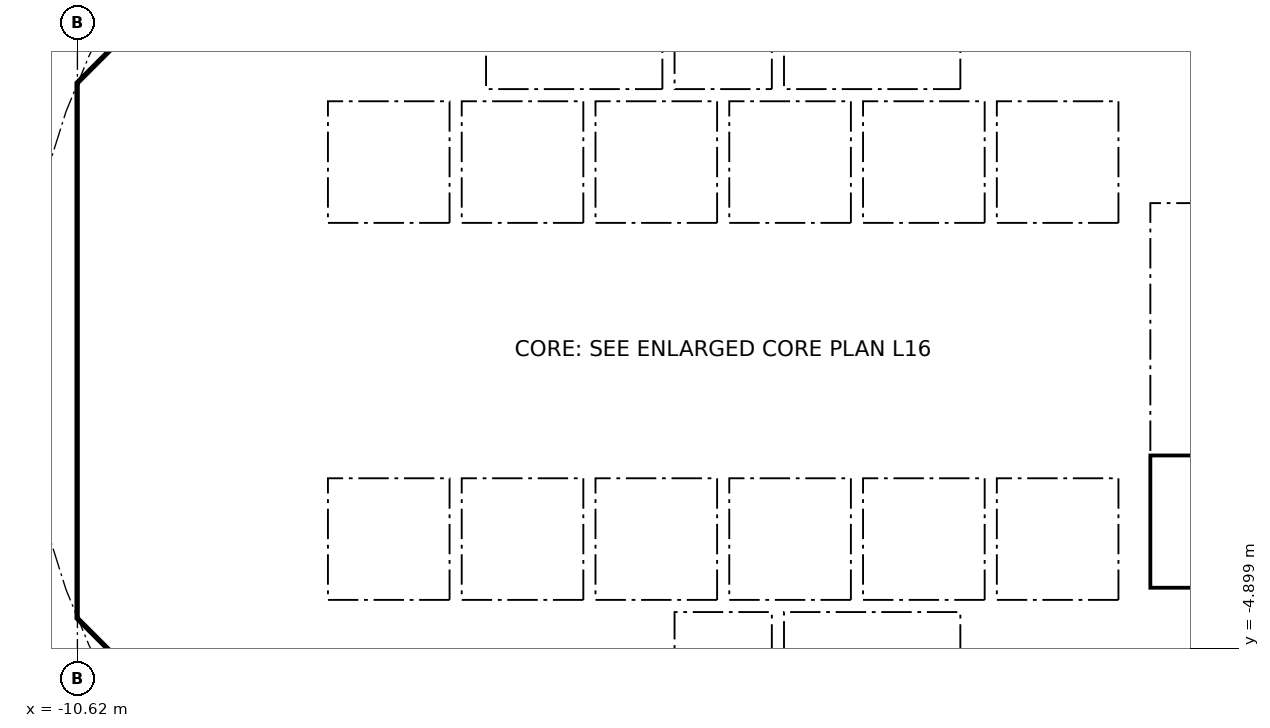
"""IFC4 building model, lengths in metres.
Left out: names, types, materials, properties, quantities, classifications, styles, units other than length and angle.
Written with IfcOpenShell. Run it as: python <this file> out.ifc"""

import sys

from ifc_helpers import new_model, si_unit, direction, frame, frame_2d, origin, place, context, subcontext, project, spatial, polyline, rectangle, outline, extrude, element, fill, save


model = new_model("IFC4")
c1 = context("Model", 3, precision=1e-05, world=origin(), true_north=direction((0.0, 1.0)))
c2 = subcontext(c1, "Body", "Model", "MODEL_VIEW")
j1 = project(units=[si_unit("LENGTHUNIT", "METRE"), si_unit("PLANEANGLEUNIT", "RADIAN")], contexts=[c1])
p1 = place(None, origin())
s1 = spatial("IfcSite", under=j1, at=p1, CompositionType="ELEMENT")
p2 = place(p1, origin())
s2 = spatial("IfcBuilding", under=s1, at=p2, CompositionType="ELEMENT")
p3 = place(p2, frame((0.0, 0.0, 67.7)))
s3 = spatial("IfcBuildingStorey", under=s2, at=p3, CompositionType="ELEMENT", Elevation=67.7)
p4 = place(p3, frame((9.988, 4.613, 0.0), z_axis=(0.0, 0.0, 1.0), x_axis=(-0.707106781187, 0.707106781187, 0.0)))
e1 = element("IfcWall", 1, at=p4, inside=s3, PredefinedType="SHEAR", context=c2, shape_type="SweptSolid", body=[
    extrude(rectangle(XDim=7.602, YDim=0.6, at=frame_2d((3.801, 0.0))), origin(), (0.0, 0.0, 1.0), 5.34),
])
p5 = place(p4, frame((3.201, 0.0, 0.0)))
e2 = element("IfcOpeningElement", 2, at=p5, cuts=e1, PredefinedType="OPENING", context=c2, shape_type="SweptSolid", body=[
    extrude(rectangle(XDim=1.2, YDim=2.1, at=frame_2d((0.6, 1.05))), frame((0.0, 0.31, 0.0), z_axis=(0.0, -1.0, 0.0), x_axis=(1.0, 0.0, 0.0)), (0.0, 0.0, 1.0), 0.62),
])
p6 = place(p3, frame((-4.613, 9.988, 0.0), z_axis=(0.0, 0.0, 1.0), x_axis=(-0.707106781187, -0.707106781187, 0.0)))
e3 = element("IfcWall", 3, at=p6, inside=s3, PredefinedType="SHEAR", context=c2, shape_type="SweptSolid", body=[
    extrude(rectangle(XDim=7.602, YDim=0.6, at=frame_2d((3.801, 0.0))), origin(), (0.0, 0.0, 1.0), 5.34),
])
p7 = place(p6, frame((0.351, 0.0, 0.0)))
e4 = element("IfcOpeningElement", 4, at=p7, cuts=e3, PredefinedType="OPENING", context=c2, shape_type="SweptSolid", body=[
    extrude(rectangle(XDim=1.1, YDim=2.1, at=frame_2d((0.55, 1.05))), frame((0.0, 0.31, 0.0), z_axis=(0.0, -1.0, 0.0), x_axis=(1.0, 0.0, 0.0)), (0.0, 0.0, 1.0), 0.62),
])
p8 = place(p3, frame((-10.325, 3.801, 0.0), z_axis=(0.0, 0.0, 1.0), x_axis=(0.0, -1.0, 0.0)))
e5 = element("IfcWall", 5, at=p8, inside=s3, PredefinedType="SHEAR", context=c2, shape_type="SweptSolid", body=[
    extrude(rectangle(XDim=7.602, YDim=0.6, at=frame_2d((3.801, 0.0))), origin(), (0.0, 0.0, 1.0), 5.34),
])
p9 = place(p8, frame((0.651, 0.0, 0.0)))
e6 = element("IfcOpeningElement", 6, at=p9, cuts=e5, PredefinedType="OPENING", context=c2, shape_type="SweptSolid", body=[
    extrude(rectangle(XDim=1.5, YDim=2.1, at=frame_2d((0.75, 1.05))), frame((0.0, 0.31, 0.0), z_axis=(0.0, -1.0, 0.0), x_axis=(1.0, 0.0, 0.0)), (0.0, 0.0, 1.0), 0.62),
])
p10 = place(p8, frame((5.451, 0.0, 0.0)))
e7 = element("IfcOpeningElement", 7, at=p10, cuts=e5, PredefinedType="OPENING", context=c2, shape_type="SweptSolid", body=[
    extrude(rectangle(XDim=1.5, YDim=2.1, at=frame_2d((0.75, 1.05))), frame((0.0, 0.31, 0.0), z_axis=(0.0, -1.0, 0.0), x_axis=(1.0, 0.0, 0.0)), (0.0, 0.0, 1.0), 0.62),
])
p11 = place(p3, frame((-9.988, -4.613, 0.0), z_axis=(0.0, 0.0, 1.0), x_axis=(0.707106781187, -0.707106781187, 0.0)))
e8 = element("IfcWall", 8, at=p11, inside=s3, PredefinedType="SHEAR", context=c2, shape_type="SweptSolid", body=[
    extrude(rectangle(XDim=7.602, YDim=0.6, at=frame_2d((3.801, 0.0))), origin(), (0.0, 0.0, 1.0), 5.34),
])
p12 = place(p11, frame((6.151, 0.0, 0.0)))
e9 = element("IfcOpeningElement", 9, at=p12, cuts=e8, PredefinedType="OPENING", context=c2, shape_type="SweptSolid", body=[
    extrude(rectangle(XDim=1.1, YDim=2.1, at=frame_2d((0.55, 1.05))), frame((0.0, 0.31, 0.0), z_axis=(0.0, -1.0, 0.0), x_axis=(1.0, 0.0, 0.0)), (0.0, 0.0, 1.0), 0.62),
])
p13 = place(p3, frame((4.613, -9.988, 0.0), z_axis=(0.0, 0.0, 1.0), x_axis=(0.707106781187, 0.707106781187, 0.0)))
e10 = element("IfcWall", 10, at=p13, inside=s3, PredefinedType="SHEAR", context=c2, shape_type="SweptSolid", body=[
    extrude(rectangle(XDim=7.602, YDim=0.6, at=frame_2d((3.801, 0.0))), origin(), (0.0, 0.0, 1.0), 5.34),
])
p14 = place(p13, frame((3.201, 0.0, 0.0)))
e11 = element("IfcOpeningElement", 11, at=p14, cuts=e10, PredefinedType="OPENING", context=c2, shape_type="SweptSolid", body=[
    extrude(rectangle(XDim=1.2, YDim=2.1, at=frame_2d((0.6, 1.05))), frame((0.0, 0.31, 0.0), z_axis=(0.0, -1.0, 0.0), x_axis=(1.0, 0.0, 0.0)), (0.0, 0.0, 1.0), 0.62),
])
p15 = place(p3, frame((-6.2, 4.3, 0.0), z_axis=(0.0, 0.0, 1.0), x_axis=(0.0, 1.0, 0.0)))
e12 = element("IfcWall", 12, at=p15, inside=s3, PredefinedType="PARTITIONING", context=c2, shape_type="SweptSolid", body=[
    extrude(rectangle(XDim=3.527, YDim=0.15, at=frame_2d((1.763, 0.0))), origin(), (0.0, 0.0, 1.0), 5.34),
])
p16 = place(p15, frame((0.262, 0.0, 0.0)))
e13 = element("IfcOpeningElement", 13, at=p16, cuts=e12, PredefinedType="OPENING", context=c2, shape_type="SweptSolid", body=[
    extrude(rectangle(XDim=0.9, YDim=2.1, at=frame_2d((0.45, 1.05))), frame((0.0, 0.085, 0.0), z_axis=(0.0, -1.0, 0.0), x_axis=(1.0, 0.0, 0.0)), (0.0, 0.0, 1.0), 0.17),
])
p17 = place(p15, frame((2.138, 0.0, 0.0)))
e14 = element("IfcOpeningElement", 14, at=p17, cuts=e12, PredefinedType="OPENING", context=c2, shape_type="SweptSolid", body=[
    extrude(rectangle(XDim=0.9, YDim=2.1, at=frame_2d((0.45, 1.05))), frame((0.0, 0.085, 0.0), z_axis=(0.0, -1.0, 0.0), x_axis=(1.0, 0.0, 0.0)), (0.0, 0.0, 1.0), 0.17),
])
p18 = place(p3, frame((4.0, 4.3, 0.0), z_axis=(0.0, 0.0, 1.0), x_axis=(0.0, 1.0, 0.0)))
e15 = element("IfcWall", 15, at=p18, inside=s3, PredefinedType="SOLIDWALL", context=c2, shape_type="SweptSolid", body=[
    extrude(rectangle(XDim=2.2, YDim=0.2, at=frame_2d((1.1, 0.0))), origin(), (0.0, 0.0, 1.0), 5.34),
])
p19 = place(p18, frame((0.55, 0.0, 0.0)))
e16 = element("IfcOpeningElement", 16, at=p19, cuts=e15, PredefinedType="OPENING", context=c2, shape_type="SweptSolid", body=[
    extrude(rectangle(XDim=1.1, YDim=2.1, at=frame_2d((0.55, 1.05))), frame((0.0, 0.11, 0.0), z_axis=(0.0, -1.0, 0.0), x_axis=(1.0, 0.0, 0.0)), (0.0, 0.0, 1.0), 0.22),
])
p20 = place(p3, frame((-4.0, 4.3, 0.0), z_axis=(0.0, 0.0, 1.0), x_axis=(0.0, 1.0, 0.0)))
e17 = element("IfcWall", 17, at=p20, inside=s3, PredefinedType="SOLIDWALL", context=c2, shape_type="SweptSolid", body=[
    extrude(rectangle(XDim=2.2, YDim=0.2, at=frame_2d((1.1, 0.0))), origin(), (0.0, 0.0, 1.0), 5.34),
])
p21 = place(p20, frame((0.55, 0.0, 0.0)))
e18 = element("IfcOpeningElement", 18, at=p21, cuts=e17, PredefinedType="OPENING", context=c2, shape_type="SweptSolid", body=[
    extrude(rectangle(XDim=1.1, YDim=2.1, at=frame_2d((0.55, 1.05))), frame((0.0, 0.11, 0.0), z_axis=(0.0, -1.0, 0.0), x_axis=(1.0, 0.0, 0.0)), (0.0, 0.0, 1.0), 0.22),
])
p22 = place(p3, frame((-6.7, 2.0, 0.0), z_axis=(0.0, 0.0, 1.0), x_axis=(1.0, 0.0, 0.0)))
e19 = element("IfcWall", 19, at=p22, inside=s3, PredefinedType="SOLIDWALL", context=c2, shape_type="SweptSolid", body=[
    extrude(rectangle(XDim=13.4, YDim=0.2, at=frame_2d((6.7, 0.0))), origin(), (0.0, 0.0, 1.0), 5.34),
])
p23 = place(p22, frame((0.65, 0.0, 0.0)))
e20 = element("IfcOpeningElement", 20, at=p23, cuts=e19, PredefinedType="OPENING", context=c2, shape_type="SweptSolid", body=[
    extrude(rectangle(XDim=1.1, YDim=2.1, at=frame_2d((0.55, 1.05))), frame((0.0, 0.11, 0.0), z_axis=(0.0, -1.0, 0.0), x_axis=(1.0, 0.0, 0.0)), (0.0, 0.0, 1.0), 0.22),
])
p24 = place(p22, frame((2.85, 0.0, 0.0)))
e21 = element("IfcOpeningElement", 21, at=p24, cuts=e19, PredefinedType="OPENING", context=c2, shape_type="SweptSolid", body=[
    extrude(rectangle(XDim=1.1, YDim=2.1, at=frame_2d((0.55, 1.05))), frame((0.0, 0.11, 0.0), z_axis=(0.0, -1.0, 0.0), x_axis=(1.0, 0.0, 0.0)), (0.0, 0.0, 1.0), 0.22),
])
p25 = place(p22, frame((5.05, 0.0, 0.0)))
e22 = element("IfcOpeningElement", 22, at=p25, cuts=e19, PredefinedType="OPENING", context=c2, shape_type="SweptSolid", body=[
    extrude(rectangle(XDim=1.1, YDim=2.1, at=frame_2d((0.55, 1.05))), frame((0.0, 0.11, 0.0), z_axis=(0.0, -1.0, 0.0), x_axis=(1.0, 0.0, 0.0)), (0.0, 0.0, 1.0), 0.22),
])
p26 = place(p3, frame((6.7, 4.0, 0.0), z_axis=(0.0, 0.0, 1.0), x_axis=(1.0, 0.0, 0.0)))
e23 = element("IfcWall", 23, at=p26, inside=s3, PredefinedType="SOLIDWALL", context=c2, shape_type="SweptSolid", body=[
    extrude(rectangle(XDim=3.325, YDim=0.2, at=frame_2d((1.662, 0.0))), origin(), (0.0, 0.0, 1.0), 5.34),
])
p27 = place(p26, frame((1.25, 0.0, 0.0)))
e24 = element("IfcOpeningElement", 24, at=p27, cuts=e23, PredefinedType="OPENING", context=c2, shape_type="SweptSolid", body=[
    extrude(rectangle(XDim=1.1, YDim=2.1, at=frame_2d((0.55, 1.05))), frame((0.0, 0.11, 0.0), z_axis=(0.0, -1.0, 0.0), x_axis=(1.0, 0.0, 0.0)), (0.0, 0.0, 1.0), 0.22),
])
p28 = place(p3, frame((-7.0, -7.027, 0.0), z_axis=(0.0, 0.0, 1.0), x_axis=(0.0, 1.0, 0.0)))
e25 = element("IfcWall", 25, at=p28, inside=s3, PredefinedType="PARTITIONING", context=c2, shape_type="SweptSolid", body=[
    extrude(rectangle(XDim=2.927, YDim=0.15, at=frame_2d((1.463, 0.0))), origin(), (0.0, 0.0, 1.0), 5.34),
])
p29 = place(p28, frame((0.976, 0.0, 0.0)))
e26 = element("IfcOpeningElement", 26, at=p29, cuts=e25, PredefinedType="OPENING", context=c2, shape_type="SweptSolid", body=[
    extrude(rectangle(XDim=0.9, YDim=2.1, at=frame_2d((0.45, 1.05))), frame((0.0, 0.085, 0.0), z_axis=(0.0, -1.0, 0.0), x_axis=(1.0, 0.0, 0.0)), (0.0, 0.0, 1.0), 0.17),
])
p30 = place(p3, frame((4.0, -6.5, 0.0), z_axis=(0.0, 0.0, 1.0), x_axis=(0.0, 1.0, 0.0)))
e27 = element("IfcWall", 27, at=p30, inside=s3, PredefinedType="SOLIDWALL", context=c2, shape_type="SweptSolid", body=[
    extrude(rectangle(XDim=2.2, YDim=0.2, at=frame_2d((1.1, 0.0))), origin(), (0.0, 0.0, 1.0), 5.34),
])
p31 = place(p30, frame((0.55, 0.0, 0.0)))
e28 = element("IfcOpeningElement", 28, at=p31, cuts=e27, PredefinedType="OPENING", context=c2, shape_type="SweptSolid", body=[
    extrude(rectangle(XDim=1.1, YDim=2.1, at=frame_2d((0.55, 1.05))), frame((0.0, 0.11, 0.0), z_axis=(0.0, -1.0, 0.0), x_axis=(1.0, 0.0, 0.0)), (0.0, 0.0, 1.0), 0.22),
])
p32 = place(p3, frame((-4.0, -6.5, 0.0), z_axis=(0.0, 0.0, 1.0), x_axis=(0.0, 1.0, 0.0)))
e29 = element("IfcWall", 29, at=p32, inside=s3, PredefinedType="SOLIDWALL", context=c2, shape_type="SweptSolid", body=[
    extrude(rectangle(XDim=2.2, YDim=0.2, at=frame_2d((1.1, 0.0))), origin(), (0.0, 0.0, 1.0), 5.34),
])
p33 = place(p32, frame((0.65, 0.0, 0.0)))
e30 = element("IfcOpeningElement", 30, at=p33, cuts=e29, PredefinedType="OPENING", context=c2, shape_type="SweptSolid", body=[
    extrude(rectangle(XDim=0.9, YDim=2.1, at=frame_2d((0.45, 1.05))), frame((0.0, 0.11, 0.0), z_axis=(0.0, -1.0, 0.0), x_axis=(1.0, 0.0, 0.0)), (0.0, 0.0, 1.0), 0.22),
])
p34 = place(p3, frame((-6.7, -2.0, 0.0), z_axis=(0.0, 0.0, 1.0), x_axis=(1.0, 0.0, 0.0)))
e31 = element("IfcWall", 31, at=p34, inside=s3, PredefinedType="SOLIDWALL", context=c2, shape_type="SweptSolid", body=[
    extrude(rectangle(XDim=13.4, YDim=0.2, at=frame_2d((6.7, 0.0))), origin(), (0.0, 0.0, 1.0), 5.34),
])
p35 = place(p34, frame((0.65, 0.0, 0.0)))
e32 = element("IfcOpeningElement", 32, at=p35, cuts=e31, PredefinedType="OPENING", context=c2, shape_type="SweptSolid", body=[
    extrude(rectangle(XDim=1.1, YDim=2.1, at=frame_2d((0.55, 1.05))), frame((0.0, 0.11, 0.0), z_axis=(0.0, -1.0, 0.0), x_axis=(1.0, 0.0, 0.0)), (0.0, 0.0, 1.0), 0.22),
])
p36 = place(p34, frame((2.85, 0.0, 0.0)))
e33 = element("IfcOpeningElement", 33, at=p36, cuts=e31, PredefinedType="OPENING", context=c2, shape_type="SweptSolid", body=[
    extrude(rectangle(XDim=1.1, YDim=2.1, at=frame_2d((0.55, 1.05))), frame((0.0, 0.11, 0.0), z_axis=(0.0, -1.0, 0.0), x_axis=(1.0, 0.0, 0.0)), (0.0, 0.0, 1.0), 0.22),
])
p37 = place(p3, origin())
e34 = element("IfcWall", 34, at=p37, inside=s3, PredefinedType="SHEAR", context=c2, shape_type="SweptSolid", body=[
    extrude(outline(polyline([(-10.625, -3.801), (-10.025, -3.801), (-10.025, -4.152), (-9.776, -4.401), (-10.2, -4.825), (-10.625, -4.401), (-10.625, -3.801)])), origin(), (0.0, 0.0, 1.0), 5.34),
])
p38 = place(p3, origin())
e35 = element("IfcWall", 35, at=p38, inside=s3, PredefinedType="SHEAR", context=c2, shape_type="SweptSolid", body=[
    extrude(outline(polyline([(-10.2, 4.825), (-9.776, 4.401), (-10.025, 4.152), (-10.025, 3.801), (-10.625, 3.801), (-10.625, 4.401), (-10.2, 4.825)])), origin(), (0.0, 0.0, 1.0), 5.34),
])
for number, where, z_axis, x_axis in (
    (36, (-10.025, -4.0, 0.0), (0.0, 0.0, 1.0), (1.0, 0.0, 0.0)),
    (37, (-10.025, 4.0, 0.0), (0.0, 0.0, 1.0), (1.0, 0.0, 0.0)),
):
    element("IfcWall", number, at=place(p3, frame(where, z_axis=z_axis, x_axis=x_axis)), inside=s3, PredefinedType="PARTITIONING", context=c2, shape_type="SweptSolid", body=[
        extrude(rectangle(XDim=3.325, YDim=0.2, at=frame_2d((1.662, 0.0))), origin(), (0.0, 0.0, 1.0), 5.34),
    ])
for number, where, z_axis, x_axis in (
    (38, (-0.9, -6.5, 0.0), (0.0, 0.0, 1.0), (0.0, 1.0, 0.0)),
    (39, (0.9, -6.5, 0.0), (0.0, 0.0, 1.0), (0.0, 1.0, 0.0)),
):
    element("IfcWall", number, at=place(p3, frame(where, z_axis=z_axis, x_axis=x_axis)), inside=s3, PredefinedType="SOLIDWALL", context=c2, shape_type="SweptSolid", body=[
        extrude(rectangle(XDim=2.2, YDim=0.2, at=frame_2d((1.1, 0.0))), origin(), (0.0, 0.0, 1.0), 5.34),
    ])
p39 = place(p3, origin())
e40 = element("IfcWall", 40, at=p39, inside=s3, PredefinedType="SOLIDWALL", context=c2, shape_type="SweptSolid", body=[
    extrude(outline(polyline([(-6.7, -2.1), (-6.5, -2.1), (-6.5, -4.1), (-4.5, -4.1), (-4.5, -2.1), (-4.3, -2.1), (-4.3, -4.1), (-2.3, -4.1), (-2.3, -2.1), (-2.1, -2.1), (-2.1, -4.1), (-0.1, -4.1), (-0.1, -2.1), (0.1, -2.1), (0.1, -4.1), (2.1, -4.1), (2.1, -2.1), (2.3, -2.1), (2.3, -4.1), (4.3, -4.1), (4.3, -2.1), (4.5, -2.1), (4.5, -4.1), (6.5, -4.1), (6.5, -2.1), (6.7, -2.1), (6.7, -4.3), (-6.7, -4.3), (-6.7, -2.1)])), origin(), (0.0, 0.0, 1.0), 5.34),
])
for number, where, z_axis, x_axis in (
    (41, (-0.9, 4.3, 0.0), (0.0, 0.0, 1.0), (0.0, 1.0, 0.0)),
    (42, (0.9, 4.3, 0.0), (0.0, 0.0, 1.0), (0.0, 1.0, 0.0)),
):
    element("IfcWall", number, at=place(p3, frame(where, z_axis=z_axis, x_axis=x_axis)), inside=s3, PredefinedType="SOLIDWALL", context=c2, shape_type="SweptSolid", body=[
        extrude(rectangle(XDim=2.2, YDim=0.2, at=frame_2d((1.1, 0.0))), origin(), (0.0, 0.0, 1.0), 5.34),
    ])
p40 = place(p3, origin())
e43 = element("IfcWall", 43, at=p40, inside=s3, PredefinedType="SOLIDWALL", context=c2, shape_type="SweptSolid", body=[
    extrude(outline(polyline([(-6.5, 2.1), (-6.7, 2.1), (-6.7, 4.3), (6.7, 4.3), (6.7, 2.1), (6.5, 2.1), (6.5, 4.1), (4.5, 4.1), (4.5, 2.1), (4.3, 2.1), (4.3, 4.1), (2.3, 4.1), (2.3, 2.1), (2.1, 2.1), (2.1, 4.1), (0.1, 4.1), (0.1, 2.1), (-0.1, 2.1), (-0.1, 4.1), (-2.1, 4.1), (-2.1, 2.1), (-2.3, 2.1), (-2.3, 4.1), (-4.3, 4.1), (-4.3, 2.1), (-4.5, 2.1), (-4.5, 4.1), (-6.5, 4.1), (-6.5, 2.1)])), origin(), (0.0, 0.0, 1.0), 5.34),
])
p41 = place(p3, origin())
e44 = element("IfcWall", 44, at=p41, inside=s3, PredefinedType="SOLIDWALL", context=c2, shape_type="SweptSolid", body=[
    extrude(outline(polyline([(7.025, -3.9), (6.7, -3.9), (6.7, 3.9), (7.025, 3.9), (7.025, -3.9)])), origin(), (0.0, 0.0, 1.0), 5.34),
])
p42 = place(p3, origin())
e45 = element("IfcWall", 45, at=p42, inside=s3, PredefinedType="SOLIDWALL", context=c2, shape_type="SweptSolid", body=[
    extrude(outline(polyline([(10.025, -4.1), (6.7, -4.1), (6.7, -3.9), (10.025, -3.9), (10.025, -4.1)])), origin(), (0.0, 0.0, 1.0), 5.34),
])
p43 = place(p23, origin())
e46 = element("IfcDoor", 46, at=p43, inside=s3, OperationType="DOUBLE_DOOR_SLIDING", PredefinedType="DOOR", context=c2, shape_type="SweptSolid", body=[
    extrude(rectangle(XDim=1.1, YDim=2.1, at=frame_2d((0.55, 1.05))), frame((0.0, 0.025, 0.0), z_axis=(0.0, -1.0, 0.0), x_axis=(1.0, 0.0, 0.0)), (0.0, 0.0, 1.0), 0.05),
])
fill(e20, e46)
p44 = place(p24, origin())
e47 = element("IfcDoor", 47, at=p44, inside=s3, OperationType="DOUBLE_DOOR_SLIDING", PredefinedType="DOOR", context=c2, shape_type="SweptSolid", body=[
    extrude(rectangle(XDim=1.1, YDim=2.1, at=frame_2d((0.55, 1.05))), frame((0.0, 0.025, 0.0), z_axis=(0.0, -1.0, 0.0), x_axis=(1.0, 0.0, 0.0)), (0.0, 0.0, 1.0), 0.05),
])
fill(e21, e47)
p45 = place(p25, origin())
e48 = element("IfcDoor", 48, at=p45, inside=s3, OperationType="DOUBLE_DOOR_SLIDING", PredefinedType="DOOR", context=c2, shape_type="SweptSolid", body=[
    extrude(rectangle(XDim=1.1, YDim=2.1, at=frame_2d((0.55, 1.05))), frame((0.0, 0.025, 0.0), z_axis=(0.0, -1.0, 0.0), x_axis=(1.0, 0.0, 0.0)), (0.0, 0.0, 1.0), 0.05),
])
fill(e22, e48)
p46 = place(p35, origin())
e49 = element("IfcDoor", 49, at=p46, inside=s3, OperationType="DOUBLE_DOOR_SLIDING", PredefinedType="DOOR", context=c2, shape_type="SweptSolid", body=[
    extrude(rectangle(XDim=1.1, YDim=2.1, at=frame_2d((0.55, 1.05))), frame((0.0, 0.025, 0.0), z_axis=(0.0, -1.0, 0.0), x_axis=(1.0, 0.0, 0.0)), (0.0, 0.0, 1.0), 0.05),
])
fill(e32, e49)
p47 = place(p36, origin())
e50 = element("IfcDoor", 50, at=p47, inside=s3, OperationType="DOUBLE_DOOR_SLIDING", PredefinedType="DOOR", context=c2, shape_type="SweptSolid", body=[
    extrude(rectangle(XDim=1.1, YDim=2.1, at=frame_2d((0.55, 1.05))), frame((0.0, 0.025, 0.0), z_axis=(0.0, -1.0, 0.0), x_axis=(1.0, 0.0, 0.0)), (0.0, 0.0, 1.0), 0.05),
])
fill(e33, e50)
p48 = place(p19, origin())
e51 = element("IfcDoor", 51, at=p48, inside=s3, OperationType="DOUBLE_DOOR_SLIDING", PredefinedType="DOOR", context=c2, shape_type="SweptSolid", body=[
    extrude(rectangle(XDim=1.1, YDim=2.1, at=frame_2d((0.55, 1.05))), frame((0.0, 0.025, 0.0), z_axis=(0.0, -1.0, 0.0), x_axis=(1.0, 0.0, 0.0)), (0.0, 0.0, 1.0), 0.05),
])
fill(e16, e51)
p49 = place(p31, origin())
e52 = element("IfcDoor", 52, at=p49, inside=s3, OperationType="DOUBLE_DOOR_SLIDING", PredefinedType="DOOR", context=c2, shape_type="SweptSolid", body=[
    extrude(rectangle(XDim=1.1, YDim=2.1, at=frame_2d((0.55, 1.05))), frame((0.0, 0.025, 0.0), z_axis=(0.0, -1.0, 0.0), x_axis=(1.0, 0.0, 0.0)), (0.0, 0.0, 1.0), 0.05),
])
fill(e28, e52)
p50 = place(p21, origin())
e53 = element("IfcDoor", 53, at=p50, inside=s3, OperationType="DOUBLE_DOOR_SLIDING", PredefinedType="DOOR", context=c2, shape_type="SweptSolid", body=[
    extrude(rectangle(XDim=1.1, YDim=2.1, at=frame_2d((0.55, 1.05))), frame((0.0, 0.025, 0.0), z_axis=(0.0, -1.0, 0.0), x_axis=(1.0, 0.0, 0.0)), (0.0, 0.0, 1.0), 0.05),
])
fill(e18, e53)
p51 = place(p16, origin())
e54 = element("IfcDoor", 54, at=p51, inside=s3, OperationType="SINGLE_SWING_LEFT", PredefinedType="DOOR", context=c2, shape_type="SweptSolid", body=[
    extrude(rectangle(XDim=0.9, YDim=2.1, at=frame_2d((0.45, 1.05))), frame((0.0, 0.025, 0.0), z_axis=(0.0, -1.0, 0.0), x_axis=(1.0, 0.0, 0.0)), (0.0, 0.0, 1.0), 0.05),
])
fill(e13, e54)
p52 = place(p9, origin())
e55 = element("IfcDoor", 55, at=p52, inside=s3, OperationType="DOUBLE_DOOR_SINGLE_SWING", PredefinedType="DOOR", context=c2, shape_type="SweptSolid", body=[
    extrude(rectangle(XDim=1.5, YDim=2.1, at=frame_2d((0.75, 1.05))), frame((0.0, 0.025, 0.0), z_axis=(0.0, -1.0, 0.0), x_axis=(1.0, 0.0, 0.0)), (0.0, 0.0, 1.0), 0.05),
])
fill(e6, e55)
p53 = place(p10, origin())
e56 = element("IfcDoor", 56, at=p53, inside=s3, OperationType="DOUBLE_DOOR_SINGLE_SWING", PredefinedType="DOOR", context=c2, shape_type="SweptSolid", body=[
    extrude(rectangle(XDim=1.5, YDim=2.1, at=frame_2d((0.75, 1.05))), frame((0.0, 0.025, 0.0), z_axis=(0.0, -1.0, 0.0), x_axis=(1.0, 0.0, 0.0)), (0.0, 0.0, 1.0), 0.05),
])
fill(e7, e56)
save(model, sys.argv[1])
